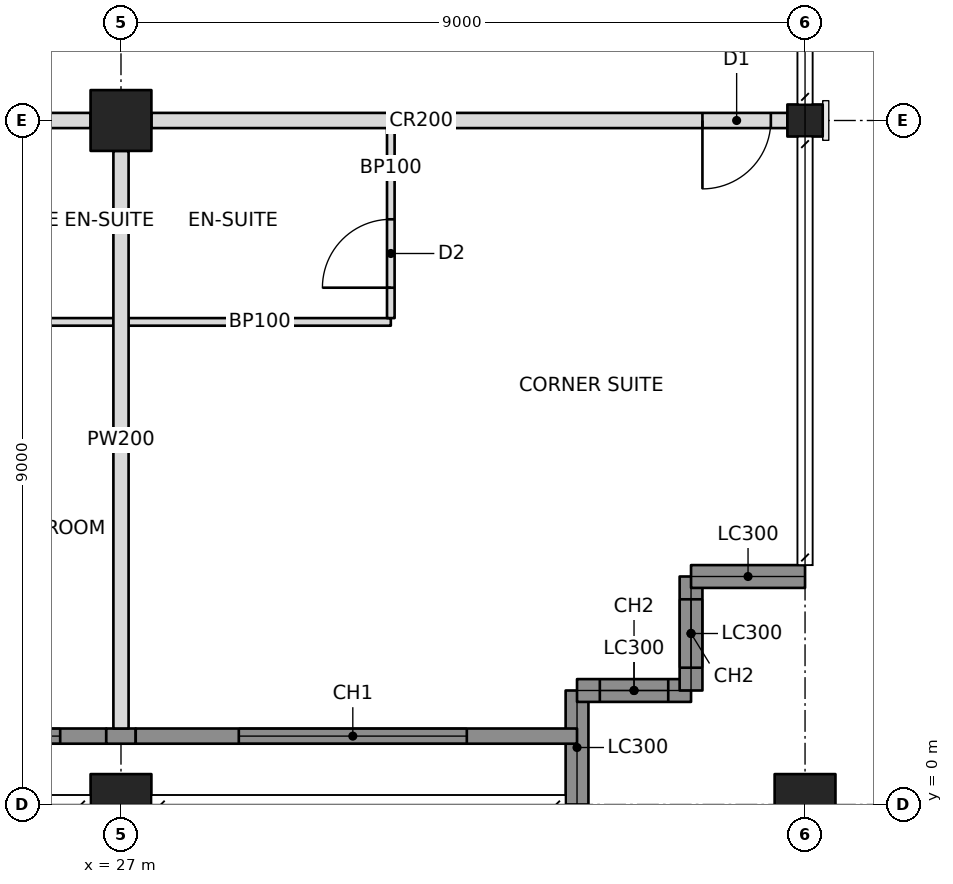
"""IFC4 building model, lengths in metres.
Left out: names, types, materials, properties, quantities, classifications, styles, units other than length and angle.
Written with IfcOpenShell. Run it as: python <this file> out.ifc"""

import sys

from ifc_helpers import new_model, si_unit, direction, frame, frame_2d, origin, origin_2d, place, context, subcontext, project, spatial, rectangle, hollow_rectangle, i_section, extrude, element, fill, save


model = new_model("IFC4")
c1 = context("Model", 3, precision=1e-05, world=origin(), true_north=direction((0.0, 1.0)))
c2 = subcontext(c1, "Body", "Model", "MODEL_VIEW")
j1 = project(units=[si_unit("LENGTHUNIT", "METRE"), si_unit("PLANEANGLEUNIT", "RADIAN")], contexts=[c1])
p1 = place(None, origin())
s1 = spatial("IfcSite", under=j1, at=p1, CompositionType="ELEMENT")
p2 = place(p1, origin())
s2 = spatial("IfcBuilding", under=s1, at=p2, CompositionType="ELEMENT")
p3 = place(p2, frame((0.0, 0.0, 237.4)))
s3 = spatial("IfcBuildingStorey", under=s2, at=p3, CompositionType="ELEMENT", Elevation=237.4)
p4 = place(p3, frame((27.0, 0.0, 0.0), z_axis=(0.0, 0.0, 1.0), x_axis=(1.0, 0.0, 0.0)))
e1 = element("IfcColumn", 1, at=p4, inside=s3, PredefinedType="COLUMN", context=c2, shape_type="SweptSolid", body=[
    extrude(hollow_rectangle(XDim=0.8, YDim=0.8, WallThickness=0.05, at=origin_2d()), origin(), (0.0, 0.0, 1.0), 3.6),
])
p5 = place(p3, frame((27.0, 9.0, 0.0), z_axis=(0.0, 0.0, 1.0), x_axis=(1.0, 0.0, 0.0)))
e2 = element("IfcColumn", 2, at=p5, inside=s3, PredefinedType="COLUMN", context=c2, shape_type="SweptSolid", body=[
    extrude(hollow_rectangle(XDim=0.8, YDim=0.8, WallThickness=0.04, at=origin_2d()), origin(), (0.0, 0.0, 1.0), 3.6),
])
p6 = place(p3, frame((36.0, 0.0, 0.0), z_axis=(0.0, 0.0, 1.0), x_axis=(1.0, 0.0, 0.0)))
e3 = element("IfcColumn", 3, at=p6, inside=s3, PredefinedType="COLUMN", context=c2, shape_type="SweptSolid", body=[
    extrude(hollow_rectangle(XDim=0.8, YDim=0.8, WallThickness=0.05, at=origin_2d()), origin(), (0.0, 0.0, 1.0), 3.6),
])
p7 = place(p3, frame((36.0, 9.0, 0.0), z_axis=(0.0, 0.0, 1.0), x_axis=(0.0, 1.0, 0.0)))
e4 = element("IfcColumn", 4, at=p7, inside=s3, PredefinedType="COLUMN", context=c2, shape_type="SweptSolid", body=[
    extrude(i_section(OverallWidth=0.422, OverallDepth=0.465, WebThickness=0.045, FlangeThickness=0.073, at=origin_2d()), origin(), (0.0, 0.0, 1.0), 3.6),
])
p8 = place(p3, frame((33.0, 0.0, 0.0), z_axis=(0.0, 0.0, 1.0), x_axis=(0.0, 1.0, 0.0)))
e5 = element("IfcWall", 5, at=p8, inside=s3, PredefinedType="SOLIDWALL", context=c2, shape_type="SweptSolid", body=[
    extrude(rectangle(XDim=1.5, YDim=0.3, at=frame_2d((0.75, 0.0))), origin(), (0.0, 0.0, 1.0), 2.62),
])
p9 = place(p3, frame((33.0, 1.5, 0.0), z_axis=(0.0, 0.0, 1.0), x_axis=(1.0, 0.0, 0.0)))
e6 = element("IfcWall", 6, at=p9, inside=s3, PredefinedType="SOLIDWALL", context=c2, shape_type="SweptSolid", body=[
    extrude(rectangle(XDim=1.5, YDim=0.3, at=frame_2d((0.75, 0.0))), origin(), (0.0, 0.0, 1.0), 3.4),
])
p10 = place(p9, frame((0.3, 0.0, 0.6)))
e7 = element("IfcOpeningElement", 7, at=p10, cuts=e6, PredefinedType="OPENING", context=c2, shape_type="SweptSolid", body=[
    extrude(rectangle(XDim=0.9, YDim=2.2, at=frame_2d((0.45, 1.1))), frame((0.0, 0.16, 0.0), z_axis=(0.0, -1.0, 0.0), x_axis=(1.0, 0.0, 0.0)), (0.0, 0.0, 1.0), 0.32),
])
p11 = place(p3, frame((34.5, 1.5, 0.0), z_axis=(0.0, 0.0, 1.0), x_axis=(0.0, 1.0, 0.0)))
e8 = element("IfcWall", 8, at=p11, inside=s3, PredefinedType="SOLIDWALL", context=c2, shape_type="SweptSolid", body=[
    extrude(rectangle(XDim=1.5, YDim=0.3, at=frame_2d((0.75, 0.0))), origin(), (0.0, 0.0, 1.0), 3.4),
])
p12 = place(p11, frame((0.3, 0.0, 0.6)))
e9 = element("IfcOpeningElement", 9, at=p12, cuts=e8, PredefinedType="OPENING", context=c2, shape_type="SweptSolid", body=[
    extrude(rectangle(XDim=0.9, YDim=2.2, at=frame_2d((0.45, 1.1))), frame((0.0, 0.16, 0.0), z_axis=(0.0, -1.0, 0.0), x_axis=(1.0, 0.0, 0.0)), (0.0, 0.0, 1.0), 0.32),
])
p13 = place(p3, frame((34.5, 3.0, 0.0), z_axis=(0.0, 0.0, 1.0), x_axis=(1.0, 0.0, 0.0)))
e10 = element("IfcWall", 10, at=p13, inside=s3, PredefinedType="SOLIDWALL", context=c2, shape_type="SweptSolid", body=[
    extrude(rectangle(XDim=1.5, YDim=0.3, at=frame_2d((0.75, 0.0))), origin(), (0.0, 0.0, 1.0), 2.62),
])
p14 = place(p3, frame((18.4, 9.0, 0.0), z_axis=(0.0, 0.0, 1.0), x_axis=(1.0, 0.0, 0.0)))
e11 = element("IfcWall", 11, at=p14, inside=s3, PredefinedType="PARTITIONING", context=c2, shape_type="SweptSolid", body=[
    extrude(rectangle(XDim=8.2, YDim=0.2, at=frame_2d((4.1, 0.0))), origin(), (0.0, 0.0, 1.0), 2.605),
])
p15 = place(p14, frame((4.35, 0.0, 0.0)))
e12 = element("IfcOpeningElement", 12, at=p15, cuts=e11, PredefinedType="OPENING", context=c2, shape_type="SweptSolid", body=[
    extrude(rectangle(XDim=0.9, YDim=2.1, at=frame_2d((0.45, 1.05))), frame((0.0, 0.11, 0.0), z_axis=(0.0, -1.0, 0.0), x_axis=(1.0, 0.0, 0.0)), (0.0, 0.0, 1.0), 0.22),
])
p16 = place(p3, frame((27.4, 9.0, 0.0), z_axis=(0.0, 0.0, 1.0), x_axis=(1.0, 0.0, 0.0)))
e13 = element("IfcWall", 13, at=p16, inside=s3, PredefinedType="PARTITIONING", context=c2, shape_type="SweptSolid", body=[
    extrude(rectangle(XDim=8.368, YDim=0.2, at=frame_2d((4.184, 0.0))), origin(), (0.0, 0.0, 1.0), 2.605),
])
p17 = place(p16, frame((7.25, 0.0, 0.0)))
e14 = element("IfcOpeningElement", 14, at=p17, cuts=e13, PredefinedType="OPENING", context=c2, shape_type="SweptSolid", body=[
    extrude(rectangle(XDim=0.9, YDim=2.1, at=frame_2d((0.45, 1.05))), frame((0.0, 0.11, 0.0), z_axis=(0.0, -1.0, 0.0), x_axis=(1.0, 0.0, 0.0)), (0.0, 0.0, 1.0), 0.22),
])
p18 = place(p3, frame((27.0, 8.6, 0.0), z_axis=(0.0, 0.0, 1.0), x_axis=(0.0, -1.0, 0.0)))
e15 = element("IfcWall", 15, at=p18, inside=s3, PredefinedType="PARTITIONING", context=c2, shape_type="SweptSolid", body=[
    extrude(rectangle(XDim=7.6, YDim=0.2, at=frame_2d((3.8, 0.0))), origin(), (0.0, 0.0, 1.0), 2.605),
])
p19 = place(p3, frame((23.95, 6.35, 0.0), z_axis=(0.0, 0.0, 1.0), x_axis=(1.0, 0.0, 0.0)))
e16 = element("IfcWall", 16, at=p19, inside=s3, PredefinedType="PARTITIONING", context=c2, shape_type="SweptSolid", body=[
    extrude(rectangle(XDim=2.95, YDim=0.1, at=frame_2d((1.475, 0.0))), origin(), (0.0, 0.0, 1.0), 2.604),
])
p20 = place(p3, frame((27.1, 6.35, 0.0), z_axis=(0.0, 0.0, 1.0), x_axis=(1.0, 0.0, 0.0)))
e17 = element("IfcWall", 17, at=p20, inside=s3, PredefinedType="PARTITIONING", context=c2, shape_type="SweptSolid", body=[
    extrude(rectangle(XDim=3.45, YDim=0.1, at=frame_2d((1.725, 0.0))), origin(), (0.0, 0.0, 1.0), 2.604),
])
p21 = place(p3, frame((30.55, 8.9, 0.0), z_axis=(0.0, 0.0, 1.0), x_axis=(0.0, -1.0, 0.0)))
e18 = element("IfcWall", 18, at=p21, inside=s3, PredefinedType="PARTITIONING", context=c2, shape_type="SweptSolid", body=[
    extrude(rectangle(XDim=2.5, YDim=0.1, at=frame_2d((1.25, 0.0))), origin(), (0.0, 0.0, 1.0), 2.604),
])
p22 = place(p21, frame((1.2, 0.0, 0.0)))
e19 = element("IfcOpeningElement", 19, at=p22, cuts=e18, PredefinedType="OPENING", context=c2, shape_type="SweptSolid", body=[
    extrude(rectangle(XDim=0.9, YDim=2.1, at=frame_2d((0.45, 1.05))), frame((0.0, 0.06, 0.0), z_axis=(0.0, -1.0, 0.0), x_axis=(1.0, 0.0, 0.0)), (0.0, 0.0, 1.0), 0.12),
])
p23 = place(p3, frame((18.194, 0.9, 0.0), z_axis=(0.0, 0.0, 1.0), x_axis=(1.0, 0.0, 0.0)))
e20 = element("IfcWall", 20, at=p23, inside=s3, PredefinedType="SOLIDWALL", context=c2, shape_type="SweptSolid", body=[
    extrude(rectangle(XDim=8.612, YDim=0.2, at=frame_2d((4.306, 0.0))), origin(), (0.0, 0.0, 1.0), 3.4),
])
p24 = place(p23, frame((0.606, 0.0, 0.6)))
e21 = element("IfcOpeningElement", 21, at=p24, cuts=e20, PredefinedType="OPENING", context=c2, shape_type="SweptSolid", body=[
    extrude(rectangle(XDim=3.0, YDim=2.2, at=frame_2d((1.5, 1.1))), frame((0.0, 0.11, 0.0), z_axis=(0.0, -1.0, 0.0), x_axis=(1.0, 0.0, 0.0)), (0.0, 0.0, 1.0), 0.22),
])
p25 = place(p23, frame((5.006, 0.0, 0.6)))
e22 = element("IfcOpeningElement", 22, at=p25, cuts=e20, PredefinedType="OPENING", context=c2, shape_type="SweptSolid", body=[
    extrude(rectangle(XDim=3.0, YDim=2.2, at=frame_2d((1.5, 1.1))), frame((0.0, 0.11, 0.0), z_axis=(0.0, -1.0, 0.0), x_axis=(1.0, 0.0, 0.0)), (0.0, 0.0, 1.0), 0.22),
])
p26 = place(p3, frame((26.806, 0.9, 0.0), z_axis=(0.0, 0.0, 1.0), x_axis=(1.0, 0.0, 0.0)))
e23 = element("IfcWall", 23, at=p26, inside=s3, PredefinedType="SOLIDWALL", context=c2, shape_type="SweptSolid", body=[
    extrude(rectangle(XDim=0.388, YDim=0.2, at=frame_2d((0.194, 0.0))), origin(), (0.0, 0.0, 1.0), 2.604),
])
p27 = place(p3, frame((27.194, 0.9, 0.0), z_axis=(0.0, 0.0, 1.0), x_axis=(1.0, 0.0, 0.0)))
e24 = element("IfcWall", 24, at=p27, inside=s3, PredefinedType="SOLIDWALL", context=c2, shape_type="SweptSolid", body=[
    extrude(rectangle(XDim=5.806, YDim=0.2, at=frame_2d((2.903, 0.0))), origin(), (0.0, 0.0, 1.0), 3.4),
])
p28 = place(p27, frame((1.356, 0.0, 0.6)))
e25 = element("IfcOpeningElement", 25, at=p28, cuts=e24, PredefinedType="OPENING", context=c2, shape_type="SweptSolid", body=[
    extrude(rectangle(XDim=3.0, YDim=2.2, at=frame_2d((1.5, 1.1))), frame((0.0, 0.11, 0.0), z_axis=(0.0, -1.0, 0.0), x_axis=(1.0, 0.0, 0.0)), (0.0, 0.0, 1.0), 0.22),
])
p29 = place(p10, origin())
e26 = element("IfcWindow", 26, at=p29, inside=s3, PartitioningType="SINGLE_PANEL", PredefinedType="WINDOW", context=c2, shape_type="SweptSolid", body=[
    extrude(rectangle(XDim=0.9, YDim=2.2, at=frame_2d((0.45, 1.1))), frame((0.0, 0.03, 0.0), z_axis=(0.0, -1.0, 0.0), x_axis=(1.0, 0.0, 0.0)), (0.0, 0.0, 1.0), 0.06),
])
fill(e7, e26)
p30 = place(p12, origin())
e27 = element("IfcWindow", 27, at=p30, inside=s3, PartitioningType="SINGLE_PANEL", PredefinedType="WINDOW", context=c2, shape_type="SweptSolid", body=[
    extrude(rectangle(XDim=0.9, YDim=2.2, at=frame_2d((0.45, 1.1))), frame((0.0, 0.03, 0.0), z_axis=(0.0, -1.0, 0.0), x_axis=(1.0, 0.0, 0.0)), (0.0, 0.0, 1.0), 0.06),
])
fill(e9, e27)
p31 = place(p25, origin())
e28 = element("IfcWindow", 28, at=p31, inside=s3, PartitioningType="TRIPLE_PANEL_VERTICAL", PredefinedType="WINDOW", context=c2, shape_type="SweptSolid", body=[
    extrude(rectangle(XDim=3.0, YDim=2.2, at=frame_2d((1.5, 1.1))), frame((0.0, 0.03, 0.0), z_axis=(0.0, -1.0, 0.0), x_axis=(1.0, 0.0, 0.0)), (0.0, 0.0, 1.0), 0.06),
])
fill(e22, e28)
p32 = place(p28, origin())
e29 = element("IfcWindow", 29, at=p32, inside=s3, PartitioningType="TRIPLE_PANEL_VERTICAL", PredefinedType="WINDOW", context=c2, shape_type="SweptSolid", body=[
    extrude(rectangle(XDim=3.0, YDim=2.2, at=frame_2d((1.5, 1.1))), frame((0.0, 0.03, 0.0), z_axis=(0.0, -1.0, 0.0), x_axis=(1.0, 0.0, 0.0)), (0.0, 0.0, 1.0), 0.06),
])
fill(e25, e29)
p33 = place(p22, frame((0.9, 0.0, 0.0), z_axis=(0.0, 0.0, 1.0), x_axis=(-1.0, 0.0, 0.0)))
e30 = element("IfcDoor", 30, at=p33, inside=s3, OperationType="SINGLE_SWING_LEFT", PredefinedType="DOOR", context=c2, shape_type="SweptSolid", body=[
    extrude(rectangle(XDim=0.9, YDim=2.1, at=frame_2d((0.45, 1.05))), frame((0.0, 0.025, 0.0), z_axis=(0.0, -1.0, 0.0), x_axis=(1.0, 0.0, 0.0)), (0.0, 0.0, 1.0), 0.05),
])
fill(e19, e30)
p34 = place(p17, frame((0.9, 0.0, 0.0), z_axis=(0.0, 0.0, 1.0), x_axis=(-1.0, 0.0, 0.0)))
e31 = element("IfcDoor", 31, at=p34, inside=s3, OperationType="SINGLE_SWING_RIGHT", PredefinedType="DOOR", context=c2, shape_type="SweptSolid", body=[
    extrude(rectangle(XDim=0.9, YDim=2.1, at=frame_2d((0.45, 1.05))), frame((0.0, 0.025, 0.0), z_axis=(0.0, -1.0, 0.0), x_axis=(1.0, 0.0, 0.0)), (0.0, 0.0, 1.0), 0.05),
])
fill(e14, e31)
save(model, sys.argv[1])
